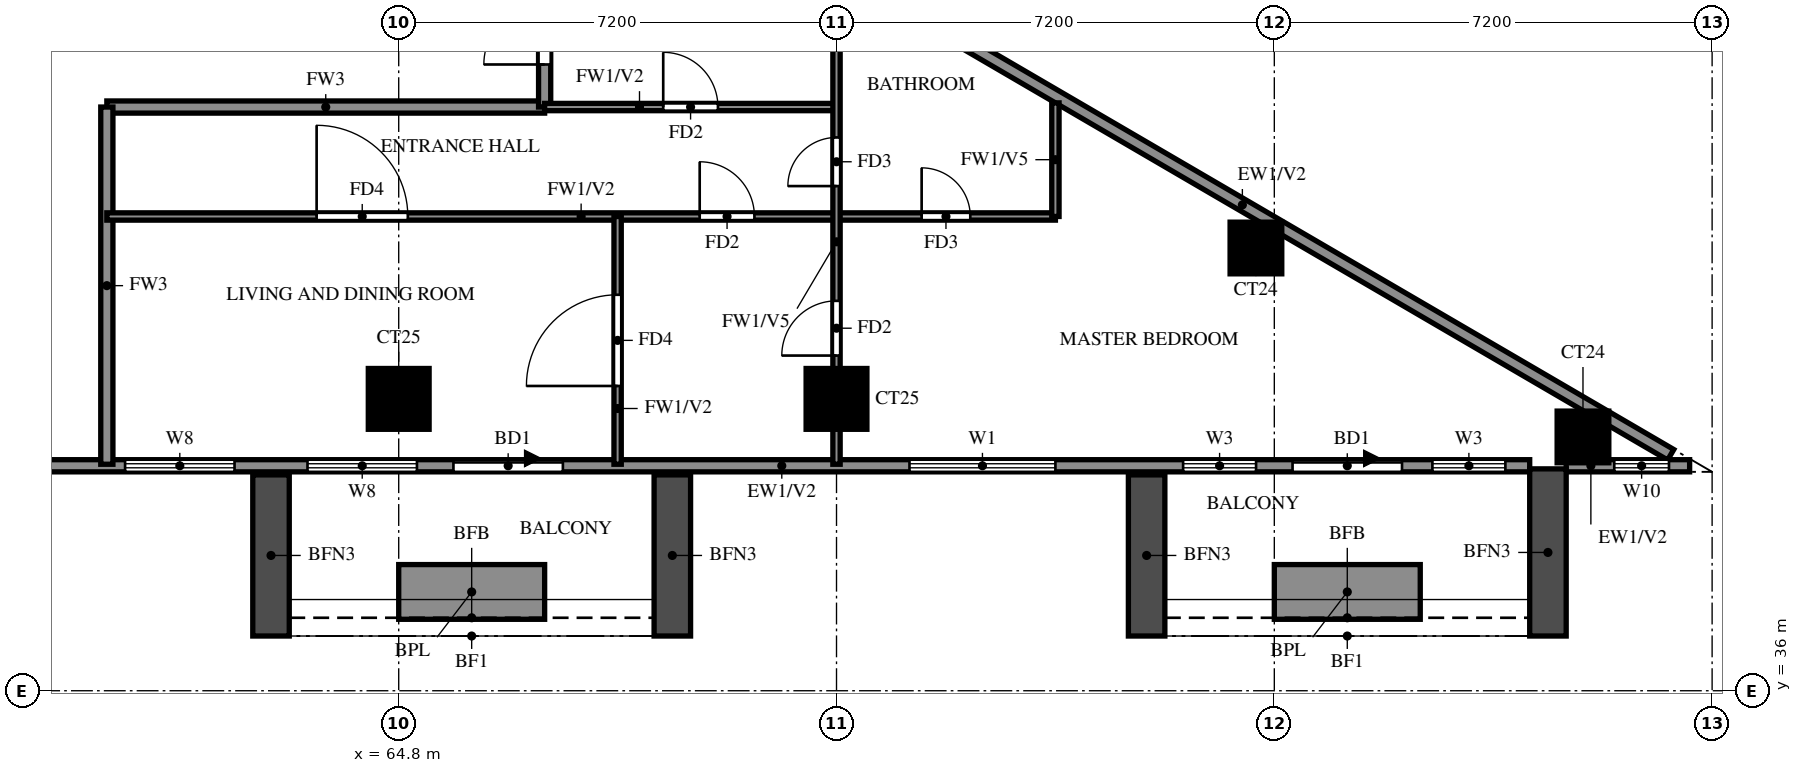
"""IFC4 building model, lengths in metres.
Left out: names, types, materials, properties, quantities, classifications, styles, units other than length and angle.
Written with IfcOpenShell. Run it as: python <this file> out.ifc"""

import sys

from ifc_helpers import new_model, si_unit, direction, frame, frame_2d, origin, origin_2d, place, context, subcontext, project, spatial, rectangle, extrude, source, transform, mapped, element, fill, save


model = new_model("IFC4")
c1 = context("Model", 3, precision=1e-05, world=origin(), true_north=direction((0.0, 1.0)))
c2 = subcontext(c1, "Body", "Model", "MODEL_VIEW")
j1 = project(units=[si_unit("LENGTHUNIT", "METRE"), si_unit("PLANEANGLEUNIT", "RADIAN")], contexts=[c1])
p1 = place(None, origin())
s1 = spatial("IfcSite", under=j1, at=p1, CompositionType="ELEMENT")
p2 = place(p1, origin())
s2 = spatial("IfcBuilding", under=s1, at=p2, CompositionType="ELEMENT")
p3 = place(p2, frame((0.0, 0.0, 157.0)))
s3 = spatial("IfcBuildingStorey", under=s2, at=p3, CompositionType="ELEMENT", Elevation=157.0)
m1 = source(origin(), c2, "Body", "SweptSolid", [
    extrude(rectangle(XDim=0.85, YDim=0.85, at=origin_2d()), origin(), (0.0, 0.0, 1.0), 3.2),
])
p4 = place(p3, frame((84.276, 40.174, 0.0), z_axis=(0.0, 0.0, 1.0), x_axis=(1.0, 0.0, 0.0)))
e1 = element("IfcColumn", 1, at=p4, inside=s3, PredefinedType="COLUMN", context=c2, shape_type="MappedRepresentation", body=[
    mapped(m1, transform((0.0, 0.0, 0.0))),
])
m2 = source(origin(), c2, "Body", "SweptSolid", [
    extrude(rectangle(XDim=1.0, YDim=1.0, at=origin_2d()), origin(), (0.0, 0.0, 1.0), 3.2),
])
for number, where, z_axis, x_axis in (
    (2, (64.8, 40.8, 0.0), (0.0, 0.0, 1.0), (1.0, 0.0, 0.0)),
    (3, (72.0, 40.8, 0.0), (0.0, 0.0, 1.0), (1.0, 0.0, 0.0)),
):
    element("IfcColumn", number, at=place(p3, frame(where, z_axis=z_axis, x_axis=x_axis)), inside=s3, PredefinedType="COLUMN", context=c2, shape_type="MappedRepresentation", body=[
        mapped(m2, transform((0.0, 0.0, 0.0))),
    ])
p5 = place(p3, frame((78.898, 43.282, 0.0), z_axis=(0.0, 0.0, 1.0), x_axis=(1.0, 0.0, 0.0)))
e4 = element("IfcColumn", 4, at=p5, inside=s3, PredefinedType="COLUMN", context=c2, shape_type="MappedRepresentation", body=[
    mapped(m1, transform((0.0, 0.0, 0.0))),
])
p6 = place(p3, frame((85.719, 39.881, 0.0), z_axis=(0.0, 0.0, 1.0), x_axis=(-0.86377618652, 0.503875678716, 0.0)))
e5 = element("IfcWall", 5, at=p6, inside=s3, PredefinedType="SOLIDWALL", context=c2, shape_type="SweptSolid", body=[
    extrude(rectangle(XDim=16.311, YDim=0.2, at=frame_2d((8.156, 0.0))), origin(), (0.0, 0.0, 1.0), 3.2),
])
p7 = place(p6, frame((13.326, 0.0, 1.5)))
e6 = element("IfcOpeningElement", 6, at=p7, cuts=e5, PredefinedType="OPENING", context=c2, shape_type="SweptSolid", body=[
    extrude(rectangle(XDim=0.9, YDim=0.9, at=frame_2d((0.45, 0.45))), frame((0.0, 0.11, 0.0), z_axis=(0.0, -1.0, 0.0), x_axis=(1.0, 0.0, 0.0)), (0.0, 0.0, 1.0), 0.22),
])
p8 = place(p3, frame((58.8, 39.7, 0.0), z_axis=(0.0, 0.0, 1.0), x_axis=(1.0, 0.0, 0.0)))
e7 = element("IfcWall", 7, at=p8, inside=s3, PredefinedType="SOLIDWALL", context=c2, shape_type="SweptSolid", body=[
    extrude(rectangle(XDim=24.6, YDim=0.2, at=frame_2d((12.3, 0.0))), origin(), (0.0, 0.0, 1.0), 3.2),
])
p9 = place(p8, frame((6.9, 0.0, 0.0)))
e8 = element("IfcOpeningElement", 8, at=p9, cuts=e7, PredefinedType="OPENING", context=c2, shape_type="SweptSolid", body=[
    extrude(rectangle(XDim=1.8, YDim=2.4, at=frame_2d((0.9, 1.2))), frame((0.0, 0.11, 0.0), z_axis=(0.0, -1.0, 0.0), x_axis=(1.0, 0.0, 0.0)), (0.0, 0.0, 1.0), 0.22),
])
p10 = place(p8, frame((20.7, 0.0, 0.0)))
e9 = element("IfcOpeningElement", 9, at=p10, cuts=e7, PredefinedType="OPENING", context=c2, shape_type="SweptSolid", body=[
    extrude(rectangle(XDim=1.8, YDim=2.4, at=frame_2d((0.9, 1.2))), frame((0.0, 0.11, 0.0), z_axis=(0.0, -1.0, 0.0), x_axis=(1.0, 0.0, 0.0)), (0.0, 0.0, 1.0), 0.22),
])
p11 = place(p8, frame((1.5, 0.0, 0.6)))
e10 = element("IfcOpeningElement", 10, at=p11, cuts=e7, PredefinedType="OPENING", context=c2, shape_type="SweptSolid", body=[
    extrude(rectangle(XDim=1.8, YDim=2.4, at=frame_2d((0.9, 1.2))), frame((0.0, 0.11, 0.0), z_axis=(0.0, -1.0, 0.0), x_axis=(1.0, 0.0, 0.0)), (0.0, 0.0, 1.0), 0.22),
])
p12 = place(p8, frame((4.5, 0.0, 0.6)))
e11 = element("IfcOpeningElement", 11, at=p12, cuts=e7, PredefinedType="OPENING", context=c2, shape_type="SweptSolid", body=[
    extrude(rectangle(XDim=1.8, YDim=2.4, at=frame_2d((0.9, 1.2))), frame((0.0, 0.11, 0.0), z_axis=(0.0, -1.0, 0.0), x_axis=(1.0, 0.0, 0.0)), (0.0, 0.0, 1.0), 0.22),
])
p13 = place(p8, frame((14.4, 0.0, 0.6)))
e12 = element("IfcOpeningElement", 12, at=p13, cuts=e7, PredefinedType="OPENING", context=c2, shape_type="SweptSolid", body=[
    extrude(rectangle(XDim=2.4, YDim=2.4, at=frame_2d((1.2, 1.2))), frame((0.0, 0.11, 0.0), z_axis=(0.0, -1.0, 0.0), x_axis=(1.0, 0.0, 0.0)), (0.0, 0.0, 1.0), 0.22),
])
p14 = place(p8, frame((18.9, 0.0, 0.6)))
e13 = element("IfcOpeningElement", 13, at=p14, cuts=e7, PredefinedType="OPENING", context=c2, shape_type="SweptSolid", body=[
    extrude(rectangle(XDim=1.2, YDim=2.4, at=frame_2d((0.6, 1.2))), frame((0.0, 0.11, 0.0), z_axis=(0.0, -1.0, 0.0), x_axis=(1.0, 0.0, 0.0)), (0.0, 0.0, 1.0), 0.22),
])
p15 = place(p8, frame((23.0, 0.0, 0.6)))
e14 = element("IfcOpeningElement", 14, at=p15, cuts=e7, PredefinedType="OPENING", context=c2, shape_type="SweptSolid", body=[
    extrude(rectangle(XDim=1.2, YDim=2.4, at=frame_2d((0.6, 1.2))), frame((0.0, 0.11, 0.0), z_axis=(0.0, -1.0, 0.0), x_axis=(1.0, 0.0, 0.0)), (0.0, 0.0, 1.0), 0.22),
])
p16 = place(p3, frame((84.0, 39.7, 0.0), z_axis=(0.0, 0.0, 1.0), x_axis=(1.0, 0.0, 0.0)))
e15 = element("IfcWall", 15, at=p16, inside=s3, PredefinedType="SOLIDWALL", context=c2, shape_type="SweptSolid", body=[
    extrude(rectangle(XDim=2.03, YDim=0.2, at=frame_2d((1.015, 0.0))), origin(), (0.0, 0.0, 1.0), 3.2),
])
p17 = place(p16, frame((0.791, 0.0, 0.6)))
e16 = element("IfcOpeningElement", 16, at=p17, cuts=e15, PredefinedType="OPENING", context=c2, shape_type="SweptSolid", body=[
    extrude(rectangle(XDim=0.9, YDim=2.4, at=frame_2d((0.45, 1.2))), frame((0.0, 0.11, 0.0), z_axis=(0.0, -1.0, 0.0), x_axis=(1.0, 0.0, 0.0)), (0.0, 0.0, 1.0), 0.22),
])
for number, where, z_axis, x_axis in (
    (17, (62.7, 39.55, 0.0), (0.0, 0.0, 1.0), (0.0, -1.0, 0.0)),
    (18, (69.3, 39.55, 0.0), (0.0, 0.0, 1.0), (0.0, -1.0, 0.0)),
):
    element("IfcWall", number, at=place(p3, frame(where, z_axis=z_axis, x_axis=x_axis)), inside=s3, PredefinedType="SOLIDWALL", context=c2, shape_type="SweptSolid", body=[
        extrude(rectangle(XDim=2.65, YDim=0.6, at=frame_2d((1.325, 0.0))), origin(), (0.0, 0.0, 1.0), 2.85),
    ])
p18 = place(p3, frame((64.8, 37.625, 0.0), z_axis=(0.0, 0.0, 1.0), x_axis=(1.0, 0.0, 0.0)))
e19 = element("IfcWall", 19, at=p18, inside=s3, PredefinedType="SOLIDWALL", context=c2, shape_type="SweptSolid", body=[
    extrude(rectangle(XDim=2.4, YDim=0.9, at=frame_2d((1.2, 0.0))), origin(), (0.0, 0.0, 1.0), 0.9),
])
p19 = place(p3, frame((77.1, 39.55, 0.0), z_axis=(0.0, 0.0, 1.0), x_axis=(0.0, -1.0, 0.0)))
e20 = element("IfcWall", 20, at=p19, inside=s3, PredefinedType="SOLIDWALL", context=c2, shape_type="SweptSolid", body=[
    extrude(rectangle(XDim=2.65, YDim=0.6, at=frame_2d((1.325, 0.0))), origin(), (0.0, 0.0, 1.0), 2.85),
])
p20 = place(p3, frame((83.7, 39.649, 0.0), z_axis=(0.0, 0.0, 1.0), x_axis=(0.0, -1.0, 0.0)))
e21 = element("IfcWall", 21, at=p20, inside=s3, PredefinedType="SOLIDWALL", context=c2, shape_type="SweptSolid", body=[
    extrude(rectangle(XDim=2.749, YDim=0.6, at=frame_2d((1.375, 0.0))), origin(), (0.0, 0.0, 1.0), 2.85),
])
p21 = place(p3, frame((79.2, 37.625, 0.0), z_axis=(0.0, 0.0, 1.0), x_axis=(1.0, 0.0, 0.0)))
e22 = element("IfcWall", 22, at=p21, inside=s3, PredefinedType="SOLIDWALL", context=c2, shape_type="SweptSolid", body=[
    extrude(rectangle(XDim=2.4, YDim=0.9, at=frame_2d((1.2, 0.0))), origin(), (0.0, 0.0, 1.0), 0.9),
])
p22 = place(p3, frame((60.0, 45.6, 0.0), z_axis=(0.0, 0.0, 1.0), x_axis=(1.0, 0.0, 0.0)))
e23 = element("IfcWall", 23, at=p22, inside=s3, PredefinedType="SOLIDWALL", context=c2, shape_type="SweptSolid", body=[
    extrude(rectangle(XDim=7.2, YDim=0.2, at=frame_2d((3.6, 0.0))), origin(), (0.0, 0.0, 1.0), 3.2),
])
p23 = place(p3, frame((60.0, 39.725, 0.0), z_axis=(0.0, 0.0, 1.0), x_axis=(0.0, 1.0, 0.0)))
e24 = element("IfcWall", 24, at=p23, inside=s3, PredefinedType="SOLIDWALL", context=c2, shape_type="SweptSolid", body=[
    extrude(rectangle(XDim=5.875, YDim=0.2, at=frame_2d((2.938, 0.0))), origin(), (0.0, 0.0, 1.0), 3.2),
])
p24 = place(p3, frame((67.2, 45.6, 0.0), z_axis=(0.0, 0.0, 1.0), x_axis=(0.0, 1.0, 0.0)))
e25 = element("IfcWall", 25, at=p24, inside=s3, PredefinedType="SOLIDWALL", context=c2, shape_type="SweptSolid", body=[
    extrude(rectangle(XDim=12.0, YDim=0.2, at=frame_2d((6.0, 0.0))), origin(), (0.0, 0.0, 1.0), 3.2),
])
p25 = place(p24, frame((10.3, 0.0, 0.0)))
e26 = element("IfcOpeningElement", 26, at=p25, cuts=e25, PredefinedType="OPENING", context=c2, shape_type="SweptSolid", body=[
    extrude(rectangle(XDim=1.0, YDim=2.1, at=frame_2d((0.5, 1.05))), frame((0.0, 0.11, 0.0), z_axis=(0.0, -1.0, 0.0), x_axis=(1.0, 0.0, 0.0)), (0.0, 0.0, 1.0), 0.22),
])
p26 = place(p24, frame((0.7, 0.0, 0.0)))
e27 = element("IfcOpeningElement", 27, at=p26, cuts=e25, PredefinedType="OPENING", context=c2, shape_type="SweptSolid", body=[
    extrude(rectangle(XDim=1.0, YDim=2.1, at=frame_2d((0.5, 1.05))), frame((0.0, 0.11, 0.0), z_axis=(0.0, -1.0, 0.0), x_axis=(1.0, 0.0, 0.0)), (0.0, 0.0, 1.0), 0.22),
])
p27 = place(p3, frame((60.0, 43.8, 0.0), z_axis=(0.0, 0.0, 1.0), x_axis=(1.0, 0.0, 0.0)))
e28 = element("IfcWall", 28, at=p27, inside=s3, PredefinedType="PARTITIONING", context=c2, shape_type="SweptSolid", body=[
    extrude(rectangle(XDim=15.6, YDim=0.12, at=frame_2d((7.8, 0.0))), origin(), (0.0, 0.0, 1.0), 3.2),
])
p28 = place(p27, frame((9.75, 0.0, 0.0)))
e29 = element("IfcOpeningElement", 29, at=p28, cuts=e28, PredefinedType="OPENING", context=c2, shape_type="SweptSolid", body=[
    extrude(rectangle(XDim=0.9, YDim=2.1, at=frame_2d((0.45, 1.05))), frame((0.0, 0.07, 0.0), z_axis=(0.0, -1.0, 0.0), x_axis=(1.0, 0.0, 0.0)), (0.0, 0.0, 1.0), 0.14),
])
p29 = place(p27, frame((3.45, 0.0, 0.0)))
e30 = element("IfcOpeningElement", 30, at=p29, cuts=e28, PredefinedType="OPENING", context=c2, shape_type="SweptSolid", body=[
    extrude(rectangle(XDim=1.5, YDim=2.1, at=frame_2d((0.75, 1.05))), frame((0.0, 0.07, 0.0), z_axis=(0.0, -1.0, 0.0), x_axis=(1.0, 0.0, 0.0)), (0.0, 0.0, 1.0), 0.14),
])
p30 = place(p27, frame((13.4, 0.0, 0.0)))
e31 = element("IfcOpeningElement", 31, at=p30, cuts=e28, PredefinedType="OPENING", context=c2, shape_type="SweptSolid", body=[
    extrude(rectangle(XDim=0.8, YDim=2.1, at=frame_2d((0.4, 1.05))), frame((0.0, 0.07, 0.0), z_axis=(0.0, -1.0, 0.0), x_axis=(1.0, 0.0, 0.0)), (0.0, 0.0, 1.0), 0.14),
])
p31 = place(p3, frame((67.2, 45.6, 0.0), z_axis=(0.0, 0.0, 1.0), x_axis=(1.0, 0.0, 0.0)))
e32 = element("IfcWall", 32, at=p31, inside=s3, PredefinedType="PARTITIONING", context=c2, shape_type="SweptSolid", body=[
    extrude(rectangle(XDim=4.8, YDim=0.12, at=frame_2d((2.4, 0.0))), origin(), (0.0, 0.0, 1.0), 3.2),
])
p32 = place(p31, frame((1.95, 0.0, 0.0)))
e33 = element("IfcOpeningElement", 33, at=p32, cuts=e32, PredefinedType="OPENING", context=c2, shape_type="SweptSolid", body=[
    extrude(rectangle(XDim=0.9, YDim=2.1, at=frame_2d((0.45, 1.05))), frame((0.0, 0.07, 0.0), z_axis=(0.0, -1.0, 0.0), x_axis=(1.0, 0.0, 0.0)), (0.0, 0.0, 1.0), 0.14),
])
p33 = place(p3, frame((68.4, 39.725, 0.0), z_axis=(0.0, 0.0, 1.0), x_axis=(0.0, 1.0, 0.0)))
e34 = element("IfcWall", 34, at=p33, inside=s3, PredefinedType="PARTITIONING", context=c2, shape_type="SweptSolid", body=[
    extrude(rectangle(XDim=4.075, YDim=0.12, at=frame_2d((2.038, 0.0))), origin(), (0.0, 0.0, 1.0), 3.2),
])
p34 = place(p33, frame((1.288, 0.0, 0.0)))
e35 = element("IfcOpeningElement", 35, at=p34, cuts=e34, PredefinedType="OPENING", context=c2, shape_type="SweptSolid", body=[
    extrude(rectangle(XDim=1.5, YDim=2.1, at=frame_2d((0.75, 1.05))), frame((0.0, 0.07, 0.0), z_axis=(0.0, -1.0, 0.0), x_axis=(1.0, 0.0, 0.0)), (0.0, 0.0, 1.0), 0.14),
])
p35 = place(p3, frame((72.0, 39.725, 0.0), z_axis=(0.0, 0.0, 1.0), x_axis=(0.0, 1.0, 0.0)))
e36 = element("IfcWall", 36, at=p35, inside=s3, PredefinedType="PARTITIONING", context=c2, shape_type="SweptSolid", body=[
    extrude(rectangle(XDim=8.13, YDim=0.12, at=frame_2d((4.065, 0.0))), origin(), (0.0, 0.0, 1.0), 2.3),
])
p36 = place(p35, frame((1.788, 0.0, 0.0)))
e37 = element("IfcOpeningElement", 37, at=p36, cuts=e36, PredefinedType="OPENING", context=c2, shape_type="SweptSolid", body=[
    extrude(rectangle(XDim=0.9, YDim=2.1, at=frame_2d((0.45, 1.05))), frame((0.0, 0.07, 0.0), z_axis=(0.0, -1.0, 0.0), x_axis=(1.0, 0.0, 0.0)), (0.0, 0.0, 1.0), 0.14),
])
p37 = place(p35, frame((4.575, 0.0, 0.0)))
e38 = element("IfcOpeningElement", 38, at=p37, cuts=e36, PredefinedType="OPENING", context=c2, shape_type="SweptSolid", body=[
    extrude(rectangle(XDim=0.8, YDim=2.1, at=frame_2d((0.4, 1.05))), frame((0.0, 0.07, 0.0), z_axis=(0.0, -1.0, 0.0), x_axis=(1.0, 0.0, 0.0)), (0.0, 0.0, 1.0), 0.14),
])
p38 = place(p3, frame((75.6, 43.8, 0.0), z_axis=(0.0, 0.0, 1.0), x_axis=(0.0, 1.0, 0.0)))
e39 = element("IfcWall", 39, at=p38, inside=s3, PredefinedType="PARTITIONING", context=c2, shape_type="SweptSolid", body=[
    extrude(rectangle(XDim=1.868, YDim=0.12, at=frame_2d((0.934, 0.0))), origin(), (0.0, 0.0, 1.0), 2.3),
])
p39 = place(p9, origin())
e40 = element("IfcDoor", 40, at=p39, inside=s3, OperationType="DOUBLE_DOOR_SLIDING", PredefinedType="DOOR", context=c2, shape_type="SweptSolid", body=[
    extrude(rectangle(XDim=1.8, YDim=2.4, at=frame_2d((0.9, 1.2))), frame((0.0, 0.025, 0.0), z_axis=(0.0, -1.0, 0.0), x_axis=(1.0, 0.0, 0.0)), (0.0, 0.0, 1.0), 0.05),
])
fill(e8, e40)
p40 = place(p10, origin())
e41 = element("IfcDoor", 41, at=p40, inside=s3, OperationType="DOUBLE_DOOR_SLIDING", PredefinedType="DOOR", context=c2, shape_type="SweptSolid", body=[
    extrude(rectangle(XDim=1.8, YDim=2.4, at=frame_2d((0.9, 1.2))), frame((0.0, 0.025, 0.0), z_axis=(0.0, -1.0, 0.0), x_axis=(1.0, 0.0, 0.0)), (0.0, 0.0, 1.0), 0.05),
])
fill(e9, e41)
p41 = place(p11, origin())
e42 = element("IfcWindow", 42, at=p41, inside=s3, PartitioningType="DOUBLE_PANEL_VERTICAL", PredefinedType="WINDOW", context=c2, shape_type="SweptSolid", body=[
    extrude(rectangle(XDim=1.8, YDim=2.4, at=frame_2d((0.9, 1.2))), frame((0.0, 0.03, 0.0), z_axis=(0.0, -1.0, 0.0), x_axis=(1.0, 0.0, 0.0)), (0.0, 0.0, 1.0), 0.06),
])
fill(e10, e42)
p42 = place(p12, origin())
e43 = element("IfcWindow", 43, at=p42, inside=s3, PartitioningType="DOUBLE_PANEL_VERTICAL", PredefinedType="WINDOW", context=c2, shape_type="SweptSolid", body=[
    extrude(rectangle(XDim=1.8, YDim=2.4, at=frame_2d((0.9, 1.2))), frame((0.0, 0.03, 0.0), z_axis=(0.0, -1.0, 0.0), x_axis=(1.0, 0.0, 0.0)), (0.0, 0.0, 1.0), 0.06),
])
fill(e11, e43)
p43 = place(p13, origin())
e44 = element("IfcWindow", 44, at=p43, inside=s3, PartitioningType="DOUBLE_PANEL_VERTICAL", PredefinedType="WINDOW", context=c2, shape_type="SweptSolid", body=[
    extrude(rectangle(XDim=2.4, YDim=2.4, at=frame_2d((1.2, 1.2))), frame((0.0, 0.03, 0.0), z_axis=(0.0, -1.0, 0.0), x_axis=(1.0, 0.0, 0.0)), (0.0, 0.0, 1.0), 0.06),
])
fill(e12, e44)
p44 = place(p14, origin())
e45 = element("IfcWindow", 45, at=p44, inside=s3, PartitioningType="SINGLE_PANEL", PredefinedType="WINDOW", context=c2, shape_type="SweptSolid", body=[
    extrude(rectangle(XDim=1.2, YDim=2.4, at=frame_2d((0.6, 1.2))), frame((0.0, 0.03, 0.0), z_axis=(0.0, -1.0, 0.0), x_axis=(1.0, 0.0, 0.0)), (0.0, 0.0, 1.0), 0.06),
])
fill(e13, e45)
p45 = place(p15, origin())
e46 = element("IfcWindow", 46, at=p45, inside=s3, PartitioningType="SINGLE_PANEL", PredefinedType="WINDOW", context=c2, shape_type="SweptSolid", body=[
    extrude(rectangle(XDim=1.2, YDim=2.4, at=frame_2d((0.6, 1.2))), frame((0.0, 0.03, 0.0), z_axis=(0.0, -1.0, 0.0), x_axis=(1.0, 0.0, 0.0)), (0.0, 0.0, 1.0), 0.06),
])
fill(e14, e46)
p46 = place(p17, origin())
e47 = element("IfcWindow", 47, at=p46, inside=s3, PartitioningType="SINGLE_PANEL", PredefinedType="WINDOW", context=c2, shape_type="SweptSolid", body=[
    extrude(rectangle(XDim=0.9, YDim=2.4, at=frame_2d((0.45, 1.2))), frame((0.0, 0.03, 0.0), z_axis=(0.0, -1.0, 0.0), x_axis=(1.0, 0.0, 0.0)), (0.0, 0.0, 1.0), 0.06),
])
fill(e16, e47)
p47 = place(p34, origin())
e48 = element("IfcDoor", 48, at=p47, inside=s3, OperationType="SINGLE_SWING_LEFT", PredefinedType="DOOR", context=c2, shape_type="SweptSolid", body=[
    extrude(rectangle(XDim=1.5, YDim=2.1, at=frame_2d((0.75, 1.05))), frame((0.0, 0.025, 0.0), z_axis=(0.0, -1.0, 0.0), x_axis=(1.0, 0.0, 0.0)), (0.0, 0.0, 1.0), 0.05),
])
fill(e35, e48)
p48 = place(p32, origin())
e49 = element("IfcDoor", 49, at=p48, inside=s3, OperationType="SINGLE_SWING_LEFT", PredefinedType="DOOR", context=c2, shape_type="SweptSolid", body=[
    extrude(rectangle(XDim=0.9, YDim=2.1, at=frame_2d((0.45, 1.05))), frame((0.0, 0.025, 0.0), z_axis=(0.0, -1.0, 0.0), x_axis=(1.0, 0.0, 0.0)), (0.0, 0.0, 1.0), 0.05),
])
fill(e33, e49)
p49 = place(p26, origin())
e50 = element("IfcDoor", 50, at=p49, inside=s3, OperationType="SINGLE_SWING_RIGHT", PredefinedType="DOOR", context=c2, shape_type="SweptSolid", body=[
    extrude(rectangle(XDim=1.0, YDim=2.1, at=frame_2d((0.5, 1.05))), frame((0.0, 0.025, 0.0), z_axis=(0.0, -1.0, 0.0), x_axis=(1.0, 0.0, 0.0)), (0.0, 0.0, 1.0), 0.05),
])
fill(e27, e50)
p50 = place(p28, origin())
e51 = element("IfcDoor", 51, at=p50, inside=s3, OperationType="SINGLE_SWING_LEFT", PredefinedType="DOOR", context=c2, shape_type="SweptSolid", body=[
    extrude(rectangle(XDim=0.9, YDim=2.1, at=frame_2d((0.45, 1.05))), frame((0.0, 0.025, 0.0), z_axis=(0.0, -1.0, 0.0), x_axis=(1.0, 0.0, 0.0)), (0.0, 0.0, 1.0), 0.05),
])
fill(e29, e51)
p51 = place(p29, origin())
e52 = element("IfcDoor", 52, at=p51, inside=s3, OperationType="SINGLE_SWING_LEFT", PredefinedType="DOOR", context=c2, shape_type="SweptSolid", body=[
    extrude(rectangle(XDim=1.5, YDim=2.1, at=frame_2d((0.75, 1.05))), frame((0.0, 0.025, 0.0), z_axis=(0.0, -1.0, 0.0), x_axis=(1.0, 0.0, 0.0)), (0.0, 0.0, 1.0), 0.05),
])
fill(e30, e52)
p52 = place(p36, origin())
e53 = element("IfcDoor", 53, at=p52, inside=s3, OperationType="SINGLE_SWING_LEFT", PredefinedType="DOOR", context=c2, shape_type="SweptSolid", body=[
    extrude(rectangle(XDim=0.9, YDim=2.1, at=frame_2d((0.45, 1.05))), frame((0.0, 0.025, 0.0), z_axis=(0.0, -1.0, 0.0), x_axis=(1.0, 0.0, 0.0)), (0.0, 0.0, 1.0), 0.05),
])
fill(e37, e53)
p53 = place(p37, origin())
e54 = element("IfcDoor", 54, at=p53, inside=s3, OperationType="SINGLE_SWING_LEFT", PredefinedType="DOOR", context=c2, shape_type="SweptSolid", body=[
    extrude(rectangle(XDim=0.8, YDim=2.1, at=frame_2d((0.4, 1.05))), frame((0.0, 0.025, 0.0), z_axis=(0.0, -1.0, 0.0), x_axis=(1.0, 0.0, 0.0)), (0.0, 0.0, 1.0), 0.05),
])
fill(e38, e54)
p54 = place(p30, origin())
e55 = element("IfcDoor", 55, at=p54, inside=s3, OperationType="SINGLE_SWING_LEFT", PredefinedType="DOOR", context=c2, shape_type="SweptSolid", body=[
    extrude(rectangle(XDim=0.8, YDim=2.1, at=frame_2d((0.4, 1.05))), frame((0.0, 0.025, 0.0), z_axis=(0.0, -1.0, 0.0), x_axis=(1.0, 0.0, 0.0)), (0.0, 0.0, 1.0), 0.05),
])
fill(e31, e55)
save(model, sys.argv[1])
